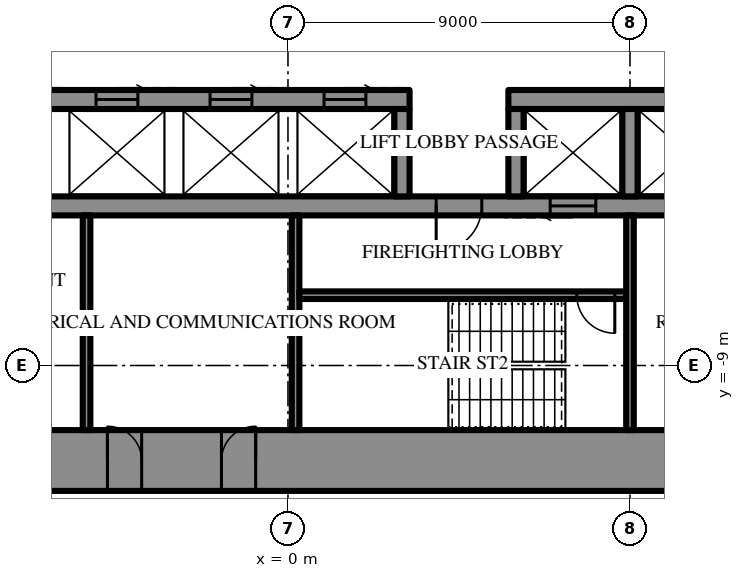
"""IFC4 building model, lengths in metres.
Left out: names, types, materials, properties, quantities, classifications, styles, units other than length and angle.
Written with IfcOpenShell. Run it as: python <this file> out.ifc"""

import sys

from ifc_helpers import new_model, si_unit, direction, frame, frame_2d, origin, place, context, subcontext, project, spatial, rectangle, extrude, element, fill, save


model = new_model("IFC4")
c1 = context("Model", 3, precision=1e-05, world=origin(), true_north=direction((0.0, 1.0)))
c2 = subcontext(c1, "Body", "Model", "MODEL_VIEW")
j1 = project(units=[si_unit("LENGTHUNIT", "METRE"), si_unit("PLANEANGLEUNIT", "RADIAN")], contexts=[c1])
p1 = place(None, origin())
s1 = spatial("IfcSite", under=j1, at=p1, CompositionType="ELEMENT")
p2 = place(p1, origin())
s2 = spatial("IfcBuilding", under=s1, at=p2, CompositionType="ELEMENT")
p3 = place(p2, frame((0.0, 0.0, 119.5)))
s3 = spatial("IfcBuildingStorey", under=s2, at=p3, CompositionType="ELEMENT", Elevation=119.5)
p4 = place(p3, frame((18.6, -11.5, 0.0), z_axis=(0.0, 0.0, 1.0), x_axis=(-1.0, 0.0, 0.0)))
e1 = element("IfcWall", 1, at=p4, inside=s3, PredefinedType="SHEAR", context=c2, shape_type="SweptSolid", body=[
    extrude(rectangle(XDim=37.2, YDim=1.6, at=frame_2d((18.6, 0.0))), origin(), (0.0, 0.0, 1.0), 4.2),
])
p5 = place(p4, frame((19.45, 0.0, 0.0)))
e2 = element("IfcOpeningElement", 2, at=p5, cuts=e1, PredefinedType="OPENING", context=c2, shape_type="SweptSolid", body=[
    extrude(rectangle(XDim=0.9, YDim=2.2, at=frame_2d((0.45, 1.1))), frame((0.0, 0.81, 0.0), z_axis=(0.0, -1.0, 0.0), x_axis=(1.0, 0.0, 0.0)), (0.0, 0.0, 1.0), 1.62),
])
p6 = place(p4, frame((22.45, 0.0, 0.0)))
e3 = element("IfcOpeningElement", 3, at=p6, cuts=e1, PredefinedType="OPENING", context=c2, shape_type="SweptSolid", body=[
    extrude(rectangle(XDim=0.9, YDim=2.2, at=frame_2d((0.45, 1.1))), frame((0.0, 0.81, 0.0), z_axis=(0.0, -1.0, 0.0), x_axis=(1.0, 0.0, 0.0)), (0.0, 0.0, 1.0), 1.62),
])
p7 = place(p4, frame((25.5, 0.0, 0.0)))
e4 = element("IfcOpeningElement", 4, at=p7, cuts=e1, PredefinedType="OPENING", context=c2, shape_type="SweptSolid", body=[
    extrude(rectangle(XDim=1.0, YDim=2.2, at=frame_2d((0.5, 1.1))), frame((0.0, 0.81, 0.0), z_axis=(0.0, -1.0, 0.0), x_axis=(1.0, 0.0, 0.0)), (0.0, 0.0, 1.0), 1.62),
])
p8 = place(p4, frame((1.8, 0.0, 0.0)))
e5 = element("IfcOpeningElement", 5, at=p8, cuts=e1, PredefinedType="OPENING", context=c2, shape_type="SweptSolid", body=[
    extrude(rectangle(XDim=0.9, YDim=2.2, at=frame_2d((0.45, 1.1))), frame((0.0, 0.81, 0.0), z_axis=(0.0, -1.0, 0.0), x_axis=(1.0, 0.0, 0.0)), (0.0, 0.0, 1.0), 1.62),
])
p9 = place(p4, frame((4.65, 0.0, 0.0)))
e6 = element("IfcOpeningElement", 6, at=p9, cuts=e1, PredefinedType="OPENING", context=c2, shape_type="SweptSolid", body=[
    extrude(rectangle(XDim=0.9, YDim=2.2, at=frame_2d((0.45, 1.1))), frame((0.0, 0.81, 0.0), z_axis=(0.0, -1.0, 0.0), x_axis=(1.0, 0.0, 0.0)), (0.0, 0.0, 1.0), 1.62),
])
p10 = place(p4, frame((7.75, 0.0, 0.0)))
e7 = element("IfcOpeningElement", 7, at=p10, cuts=e1, PredefinedType="OPENING", context=c2, shape_type="SweptSolid", body=[
    extrude(rectangle(XDim=0.9, YDim=2.2, at=frame_2d((0.45, 1.1))), frame((0.0, 0.81, 0.0), z_axis=(0.0, -1.0, 0.0), x_axis=(1.0, 0.0, 0.0)), (0.0, 0.0, 1.0), 1.62),
])
p11 = place(p4, frame((28.55, 0.0, 0.0)))
e8 = element("IfcOpeningElement", 8, at=p11, cuts=e1, PredefinedType="OPENING", context=c2, shape_type="SweptSolid", body=[
    extrude(rectangle(XDim=0.9, YDim=2.2, at=frame_2d((0.45, 1.1))), frame((0.0, 0.81, 0.0), z_axis=(0.0, -1.0, 0.0), x_axis=(1.0, 0.0, 0.0)), (0.0, 0.0, 1.0), 1.62),
])
p12 = place(p4, frame((31.65, 0.0, 0.0)))
e9 = element("IfcOpeningElement", 9, at=p12, cuts=e1, PredefinedType="OPENING", context=c2, shape_type="SweptSolid", body=[
    extrude(rectangle(XDim=0.9, YDim=2.2, at=frame_2d((0.45, 1.1))), frame((0.0, 0.81, 0.0), z_axis=(0.0, -1.0, 0.0), x_axis=(1.0, 0.0, 0.0)), (0.0, 0.0, 1.0), 1.62),
])
p13 = place(p4, frame((34.5, 0.0, 0.0)))
e10 = element("IfcOpeningElement", 10, at=p13, cuts=e1, PredefinedType="OPENING", context=c2, shape_type="SweptSolid", body=[
    extrude(rectangle(XDim=0.9, YDim=2.2, at=frame_2d((0.45, 1.1))), frame((0.0, 0.81, 0.0), z_axis=(0.0, -1.0, 0.0), x_axis=(1.0, 0.0, 0.0)), (0.0, 0.0, 1.0), 1.62),
])
p14 = place(p3, frame((11.7, -2.0, 0.0), z_axis=(0.0, 0.0, 1.0), x_axis=(-1.0, 0.0, 0.0)))
e11 = element("IfcWall", 11, at=p14, inside=s3, PredefinedType="SHEAR", context=c2, shape_type="SweptSolid", body=[
    extrude(rectangle(XDim=5.9, YDim=0.5, at=frame_2d((2.95, 0.0))), origin(), (0.0, 0.0, 1.0), 4.2),
])
p15 = place(p3, frame((3.2, -2.0, 0.0), z_axis=(0.0, 0.0, 1.0), x_axis=(-1.0, 0.0, 0.0)))
e12 = element("IfcWall", 12, at=p15, inside=s3, PredefinedType="SHEAR", context=c2, shape_type="SweptSolid", body=[
    extrude(rectangle(XDim=14.9, YDim=0.5, at=frame_2d((7.45, 0.0))), origin(), (0.0, 0.0, 1.0), 4.2),
])
p16 = place(p15, frame((1.15, 0.0, 0.0)))
e13 = element("IfcOpeningElement", 13, at=p16, cuts=e12, PredefinedType="OPENING", context=c2, shape_type="SweptSolid", body=[
    extrude(rectangle(XDim=1.1, YDim=2.2, at=frame_2d((0.55, 1.1))), frame((0.0, 0.26, 0.0), z_axis=(0.0, -1.0, 0.0), x_axis=(1.0, 0.0, 0.0)), (0.0, 0.0, 1.0), 0.52),
])
p17 = place(p15, frame((4.15, 0.0, 0.0)))
e14 = element("IfcOpeningElement", 14, at=p17, cuts=e12, PredefinedType="OPENING", context=c2, shape_type="SweptSolid", body=[
    extrude(rectangle(XDim=1.1, YDim=2.2, at=frame_2d((0.55, 1.1))), frame((0.0, 0.26, 0.0), z_axis=(0.0, -1.0, 0.0), x_axis=(1.0, 0.0, 0.0)), (0.0, 0.0, 1.0), 0.52),
])
p18 = place(p15, frame((7.15, 0.0, 0.0)))
e15 = element("IfcOpeningElement", 15, at=p18, cuts=e12, PredefinedType="OPENING", context=c2, shape_type="SweptSolid", body=[
    extrude(rectangle(XDim=1.1, YDim=2.2, at=frame_2d((0.55, 1.1))), frame((0.0, 0.26, 0.0), z_axis=(0.0, -1.0, 0.0), x_axis=(1.0, 0.0, 0.0)), (0.0, 0.0, 1.0), 0.52),
])
p19 = place(p15, frame((10.15, 0.0, 0.0)))
e16 = element("IfcOpeningElement", 16, at=p19, cuts=e12, PredefinedType="OPENING", context=c2, shape_type="SweptSolid", body=[
    extrude(rectangle(XDim=1.1, YDim=2.2, at=frame_2d((0.55, 1.1))), frame((0.0, 0.26, 0.0), z_axis=(0.0, -1.0, 0.0), x_axis=(1.0, 0.0, 0.0)), (0.0, 0.0, 1.0), 0.52),
])
p20 = place(p3, frame((11.7, -4.8, 0.0), z_axis=(0.0, 0.0, 1.0), x_axis=(-1.0, 0.0, 0.0)))
e17 = element("IfcWall", 17, at=p20, inside=s3, PredefinedType="SHEAR", context=c2, shape_type="SweptSolid", body=[
    extrude(rectangle(XDim=23.4, YDim=0.5, at=frame_2d((11.7, 0.0))), origin(), (0.0, 0.0, 1.0), 4.2),
])
p21 = place(p20, frame((6.6, 0.0, 0.0)))
e18 = element("IfcOpeningElement", 18, at=p21, cuts=e17, PredefinedType="OPENING", context=c2, shape_type="SweptSolid", body=[
    extrude(rectangle(XDim=1.2, YDim=2.2, at=frame_2d((0.6, 1.1))), frame((0.0, 0.26, 0.0), z_axis=(0.0, -1.0, 0.0), x_axis=(1.0, 0.0, 0.0)), (0.0, 0.0, 1.0), 0.52),
])
p22 = place(p20, frame((3.6, 0.0, 0.0)))
e19 = element("IfcOpeningElement", 19, at=p22, cuts=e17, PredefinedType="OPENING", context=c2, shape_type="SweptSolid", body=[
    extrude(rectangle(XDim=1.2, YDim=2.2, at=frame_2d((0.6, 1.1))), frame((0.0, 0.26, 0.0), z_axis=(0.0, -1.0, 0.0), x_axis=(1.0, 0.0, 0.0)), (0.0, 0.0, 1.0), 0.52),
])
for number, where, z_axis, x_axis in (
    (20, (9.0, -2.25, 0.0), (0.0, 0.0, 1.0), (0.0, -1.0, 0.0)),
    (21, (6.0, -2.25, 0.0), (0.0, 0.0, 1.0), (0.0, -1.0, 0.0)),
    (22, (3.0, -2.25, 0.0), (0.0, 0.0, 1.0), (0.0, -1.0, 0.0)),
):
    element("IfcWall", number, at=place(p3, frame(where, z_axis=z_axis, x_axis=x_axis)), inside=s3, PredefinedType="SHEAR", context=c2, shape_type="SweptSolid", body=[
        extrude(rectangle(XDim=2.3, YDim=0.4, at=frame_2d((1.15, 0.0))), origin(), (0.0, 0.0, 1.0), 4.2),
    ])
p23 = place(p3, frame((0.2, -5.05, 0.0), z_axis=(0.0, 0.0, 1.0), x_axis=(0.0, -1.0, 0.0)))
e23 = element("IfcWall", 23, at=p23, inside=s3, PredefinedType="SHEAR", context=c2, shape_type="SweptSolid", body=[
    extrude(rectangle(XDim=5.65, YDim=0.2, at=frame_2d((2.825, 0.0))), origin(), (0.0, 0.0, 1.0), 4.2),
])
p24 = place(p3, frame((8.9, -7.15, 0.0), z_axis=(0.0, 0.0, 1.0), x_axis=(-1.0, 0.0, 0.0)))
e24 = element("IfcWall", 24, at=p24, inside=s3, PredefinedType="SHEAR", context=c2, shape_type="SweptSolid", body=[
    extrude(rectangle(XDim=8.6, YDim=0.2, at=frame_2d((4.3, 0.0))), origin(), (0.0, 0.0, 1.0), 4.2),
])
p25 = place(p24, frame((0.3, 0.0, 0.0)))
e25 = element("IfcOpeningElement", 25, at=p25, cuts=e24, PredefinedType="OPENING", context=c2, shape_type="SweptSolid", body=[
    extrude(rectangle(XDim=1.0, YDim=2.2, at=frame_2d((0.5, 1.1))), frame((0.0, 0.11, 0.0), z_axis=(0.0, -1.0, 0.0), x_axis=(1.0, 0.0, 0.0)), (0.0, 0.0, 1.0), 0.22),
])
for number, where, z_axis, x_axis in (
    (26, (9.0, -5.05, 0.0), (0.0, 0.0, 1.0), (0.0, -1.0, 0.0)),
    (27, (-5.3, -5.05, 0.0), (0.0, 0.0, 1.0), (0.0, -1.0, 0.0)),
):
    element("IfcWall", number, at=place(p3, frame(where, z_axis=z_axis, x_axis=x_axis)), inside=s3, PredefinedType="PARTITIONING", context=c2, shape_type="SweptSolid", body=[
        extrude(rectangle(XDim=5.65, YDim=0.2, at=frame_2d((2.825, 0.0))), origin(), (0.0, 0.0, 1.0), 4.0),
    ])
p26 = place(p21, origin())
e28 = element("IfcDoor", 28, at=p26, inside=s3, OperationType="SINGLE_SWING_LEFT", PredefinedType="DOOR", context=c2, shape_type="SweptSolid", body=[
    extrude(rectangle(XDim=1.2, YDim=2.2, at=frame_2d((0.6, 1.1))), frame((0.0, 0.025, 0.0), z_axis=(0.0, -1.0, 0.0), x_axis=(1.0, 0.0, 0.0)), (0.0, 0.0, 1.0), 0.05),
])
fill(e18, e28)
p27 = place(p25, origin())
e29 = element("IfcDoor", 29, at=p27, inside=s3, OperationType="SINGLE_SWING_RIGHT", PredefinedType="DOOR", context=c2, shape_type="SweptSolid", body=[
    extrude(rectangle(XDim=1.0, YDim=2.2, at=frame_2d((0.5, 1.1))), frame((0.0, 0.025, 0.0), z_axis=(0.0, -1.0, 0.0), x_axis=(1.0, 0.0, 0.0)), (0.0, 0.0, 1.0), 0.05),
])
fill(e25, e29)
p28 = place(p5, frame((0.9, 0.0, 0.0), z_axis=(0.0, 0.0, 1.0), x_axis=(-1.0, 0.0, 0.0)))
e30 = element("IfcDoor", 30, at=p28, inside=s3, OperationType="SINGLE_SWING_LEFT", PredefinedType="DOOR", context=c2, shape_type="SweptSolid", body=[
    extrude(rectangle(XDim=0.9, YDim=2.2, at=frame_2d((0.45, 1.1))), frame((0.0, 0.025, 0.0), z_axis=(0.0, -1.0, 0.0), x_axis=(1.0, 0.0, 0.0)), (0.0, 0.0, 1.0), 0.05),
])
fill(e2, e30)
p29 = place(p6, frame((0.9, 0.0, 0.0), z_axis=(0.0, 0.0, 1.0), x_axis=(-1.0, 0.0, 0.0)))
e31 = element("IfcDoor", 31, at=p29, inside=s3, OperationType="SINGLE_SWING_RIGHT", PredefinedType="DOOR", context=c2, shape_type="SweptSolid", body=[
    extrude(rectangle(XDim=0.9, YDim=2.2, at=frame_2d((0.45, 1.1))), frame((0.0, 0.025, 0.0), z_axis=(0.0, -1.0, 0.0), x_axis=(1.0, 0.0, 0.0)), (0.0, 0.0, 1.0), 0.05),
])
fill(e3, e31)
p30 = place(p22, origin())
e32 = element("IfcDoor", 32, at=p30, inside=s3, OperationType="SLIDING_TO_LEFT", PredefinedType="DOOR", context=c2, shape_type="SweptSolid", body=[
    extrude(rectangle(XDim=1.2, YDim=2.2, at=frame_2d((0.6, 1.1))), frame((0.0, 0.025, 0.0), z_axis=(0.0, -1.0, 0.0), x_axis=(1.0, 0.0, 0.0)), (0.0, 0.0, 1.0), 0.05),
])
fill(e19, e32)
p31 = place(p16, frame((1.1, 0.0, 0.0), z_axis=(0.0, 0.0, 1.0), x_axis=(-1.0, 0.0, 0.0)))
e33 = element("IfcDoor", 33, at=p31, inside=s3, OperationType="SLIDING_TO_LEFT", PredefinedType="DOOR", context=c2, shape_type="SweptSolid", body=[
    extrude(rectangle(XDim=1.1, YDim=2.2, at=frame_2d((0.55, 1.1))), frame((0.0, 0.025, 0.0), z_axis=(0.0, -1.0, 0.0), x_axis=(1.0, 0.0, 0.0)), (0.0, 0.0, 1.0), 0.05),
])
fill(e13, e33)
p32 = place(p17, frame((1.1, 0.0, 0.0), z_axis=(0.0, 0.0, 1.0), x_axis=(-1.0, 0.0, 0.0)))
e34 = element("IfcDoor", 34, at=p32, inside=s3, OperationType="SLIDING_TO_LEFT", PredefinedType="DOOR", context=c2, shape_type="SweptSolid", body=[
    extrude(rectangle(XDim=1.1, YDim=2.2, at=frame_2d((0.55, 1.1))), frame((0.0, 0.025, 0.0), z_axis=(0.0, -1.0, 0.0), x_axis=(1.0, 0.0, 0.0)), (0.0, 0.0, 1.0), 0.05),
])
fill(e14, e34)
p33 = place(p18, frame((1.1, 0.0, 0.0), z_axis=(0.0, 0.0, 1.0), x_axis=(-1.0, 0.0, 0.0)))
e35 = element("IfcDoor", 35, at=p33, inside=s3, OperationType="SLIDING_TO_LEFT", PredefinedType="DOOR", context=c2, shape_type="SweptSolid", body=[
    extrude(rectangle(XDim=1.1, YDim=2.2, at=frame_2d((0.55, 1.1))), frame((0.0, 0.025, 0.0), z_axis=(0.0, -1.0, 0.0), x_axis=(1.0, 0.0, 0.0)), (0.0, 0.0, 1.0), 0.05),
])
fill(e15, e35)
save(model, sys.argv[1])
